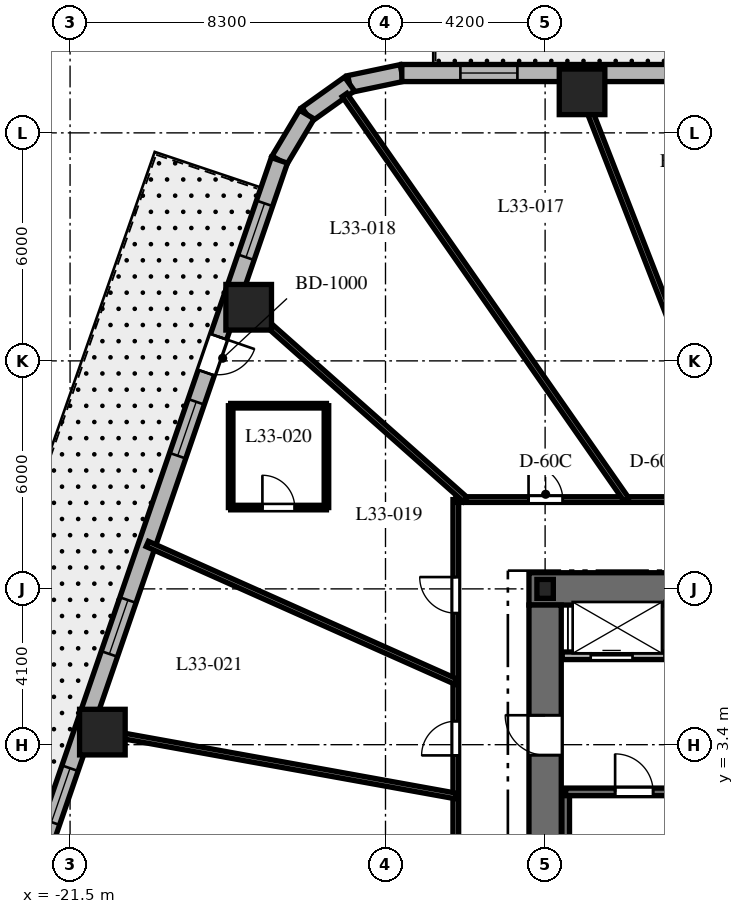
"""IFC4 building model, lengths in metres.
Left out: names, types, materials, properties, quantities, classifications, styles, units other than length and angle.
Written with IfcOpenShell. Run it as: python <this file> out.ifc"""

import sys

from ifc_helpers import new_model, si_unit, direction, frame, frame_2d, origin, origin_2d, place, context, subcontext, project, spatial, rectangle, i_section, extrude, element, fill, save


model = new_model("IFC4")
c1 = context("Model", 3, precision=1e-05, world=origin(), true_north=direction((0.0, 1.0)))
c2 = subcontext(c1, "Body", "Model", "MODEL_VIEW")
j1 = project(units=[si_unit("LENGTHUNIT", "METRE"), si_unit("PLANEANGLEUNIT", "RADIAN")], contexts=[c1])
p1 = place(None, origin())
s1 = spatial("IfcSite", under=j1, at=p1, CompositionType="ELEMENT")
p2 = place(p1, origin())
s2 = spatial("IfcBuilding", under=s1, at=p2, CompositionType="ELEMENT")
p3 = place(p2, frame((0.0, 0.0, 135.8)))
s3 = spatial("IfcBuildingStorey", under=s2, at=p3, CompositionType="ELEMENT", Elevation=135.8)
p4 = place(p3, frame((-9.425, 7.5, 0.0), z_axis=(0.0, 0.0, 1.0), x_axis=(1.0, 0.0, 0.0)))
e1 = element("IfcWall", 1, at=p4, inside=s3, PredefinedType="SHEAR", context=c2, shape_type="SweptSolid", body=[
    extrude(rectangle(XDim=9.475, YDim=0.85, at=frame_2d((4.738, 0.0))), origin(), (0.0, 0.0, 1.0), 3.7),
])
p5 = place(p3, frame((-9.0, -7.075, 0.0), z_axis=(0.0, 0.0, 1.0), x_axis=(0.0, 1.0, 0.0)))
e2 = element("IfcWall", 2, at=p5, inside=s3, PredefinedType="SHEAR", context=c2, shape_type="SweptSolid", body=[
    extrude(rectangle(XDim=14.15, YDim=0.85, at=frame_2d((7.075, 0.0))), origin(), (0.0, 0.0, 1.0), 3.7),
])
p6 = place(p5, frame((10.2, 0.0, 0.0)))
e3 = element("IfcOpeningElement", 3, at=p6, cuts=e2, PredefinedType="OPENING", context=c2, shape_type="SweptSolid", body=[
    extrude(rectangle(XDim=1.05, YDim=2.15, at=frame_2d((0.525, 1.075))), frame((0.0, 0.435, 0.0), z_axis=(0.0, -1.0, 0.0), x_axis=(1.0, 0.0, 0.0)), (0.0, 0.0, 1.0), 0.87),
])
p7 = place(p3, frame((-8.458, -6.985, 0.0), z_axis=(0.0, 0.0, 1.0), x_axis=(0.0, 1.0, 0.0)))
e4 = element("IfcWall", 4, at=p7, inside=s3, PredefinedType="SHEAR", context=c2, shape_type="SweptSolid", body=[
    extrude(rectangle(XDim=9.143, YDim=0.2, at=frame_2d((4.572, 0.0))), origin(), (0.0, 0.0, 1.0), 3.7),
])
p8 = place(p3, frame((-8.458, 2.158, 0.0), z_axis=(0.0, 0.0, 1.0), x_axis=(1.0, 0.0, 0.0)))
e5 = element("IfcWall", 5, at=p8, inside=s3, PredefinedType="SHEAR", context=c2, shape_type="SweptSolid", body=[
    extrude(rectangle(XDim=3.686, YDim=0.2, at=frame_2d((1.843, 0.0))), origin(), (0.0, 0.0, 1.0), 3.7),
])
p9 = place(p8, frame((1.3, 0.0, 0.0)))
e6 = element("IfcOpeningElement", 6, at=p9, cuts=e5, PredefinedType="OPENING", context=c2, shape_type="SweptSolid", body=[
    extrude(rectangle(XDim=1.0, YDim=2.15, at=frame_2d((0.5, 1.075))), frame((0.0, 0.11, 0.0), z_axis=(0.0, -1.0, 0.0), x_axis=(1.0, 0.0, 0.0)), (0.0, 0.0, 1.0), 0.22),
])
p10 = place(p3, frame((-9.0, 7.5, 0.0), z_axis=(0.0, 0.0, 1.0), x_axis=(1.0, 0.0, 0.0)))
e7 = element("IfcColumn", 7, at=p10, inside=s3, PredefinedType="COLUMN", context=c2, shape_type="SweptSolid", body=[
    extrude(i_section(OverallWidth=0.432, OverallDepth=0.498, WebThickness=0.056, FlangeThickness=0.089, at=origin_2d()), origin(), (0.0, 0.0, 1.0), 3.7),
])
for number, where, z_axis, x_axis in (
    (8, (-8.028, 20.58, 0.0), (0.0, 0.0, 1.0), (1.0, 0.0, 0.0)),
    (9, (-16.8, 14.911, 0.0), (0.0, 0.0, 1.0), (1.0, 0.0, 0.0)),
    (10, (-20.65, 3.731, 0.0), (0.0, 0.0, 1.0), (1.0, 0.0, 0.0)),
):
    element("IfcColumn", number, at=place(p3, frame(where, z_axis=z_axis, x_axis=x_axis)), inside=s3, PredefinedType="COLUMN", context=c2, shape_type="SweptSolid", body=[
        extrude(rectangle(XDim=1.2, YDim=1.2, at=origin_2d()), origin(), (0.0, 0.0, 1.0), 3.7),
    ])
p11 = place(p3, frame((-12.771, 21.075, 0.0), z_axis=(0.0, 0.0, 1.0), x_axis=(-0.97874281988, -0.205091424819, 0.0)))
e11 = element("IfcWall", 11, at=p11, inside=s3, PredefinedType="SOLIDWALL", context=c2, shape_type="SweptSolid", body=[
    extrude(rectangle(XDim=1.406, YDim=0.45, at=frame_2d((0.703, 0.0))), origin(), (0.0, 0.0, 1.0), 3.38),
])
p12 = place(p3, frame((-14.146, 20.787, 0.0), z_axis=(0.0, 0.0, 1.0), x_axis=(-0.814162929117, -0.580636482536, 0.0)))
e12 = element("IfcWall", 12, at=p12, inside=s3, PredefinedType="SOLIDWALL", context=c2, shape_type="SweptSolid", body=[
    extrude(rectangle(XDim=1.382, YDim=0.45, at=frame_2d((0.691, 0.0))), origin(), (0.0, 0.0, 1.0), 3.38),
])
p13 = place(p3, frame((-15.272, 19.984, 0.0), z_axis=(0.0, 0.0, 1.0), x_axis=(-0.512579347361, -0.858639862025, 0.0)))
e13 = element("IfcWall", 13, at=p13, inside=s3, PredefinedType="SOLIDWALL", context=c2, shape_type="SweptSolid", body=[
    extrude(rectangle(XDim=1.406, YDim=0.45, at=frame_2d((0.703, 0.0))), origin(), (0.0, 0.0, 1.0), 3.38),
])
p14 = place(p3, frame((11.012, 21.075, 0.0), z_axis=(0.0, 0.0, 1.0), x_axis=(-1.0, 0.0, 0.0)))
e14 = element("IfcWall", 14, at=p14, inside=s3, PredefinedType="SOLIDWALL", context=c2, shape_type="SweptSolid", body=[
    extrude(rectangle(XDim=23.782, YDim=0.45, at=frame_2d((11.891, 0.0))), origin(), (0.0, 0.0, 1.0), 3.38),
])
p15 = place(p14, frame((2.473, 0.0, 0.0)))
e15 = element("IfcOpeningElement", 15, at=p15, cuts=e14, PredefinedType="OPENING", context=c2, shape_type="SweptSolid", body=[
    extrude(rectangle(XDim=0.95, YDim=2.15, at=frame_2d((0.475, 1.075))), frame((0.0, 0.235, 0.0), z_axis=(0.0, -1.0, 0.0), x_axis=(1.0, 0.0, 0.0)), (0.0, 0.0, 1.0), 0.47),
])
p16 = place(p14, frame((11.142, 0.0, 0.8)))
e16 = element("IfcOpeningElement", 16, at=p16, cuts=e14, PredefinedType="OPENING", context=c2, shape_type="SweptSolid", body=[
    extrude(rectangle(XDim=1.5, YDim=1.8, at=frame_2d((0.75, 0.9))), frame((0.0, 0.235, 0.0), z_axis=(0.0, -1.0, 0.0), x_axis=(1.0, 0.0, 0.0)), (0.0, 0.0, 1.0), 0.47),
])
p17 = place(p14, frame((20.741, 0.0, 0.8)))
e17 = element("IfcOpeningElement", 17, at=p17, cuts=e14, PredefinedType="OPENING", context=c2, shape_type="SweptSolid", body=[
    extrude(rectangle(XDim=1.5, YDim=1.8, at=frame_2d((0.75, 0.9))), frame((0.0, 0.235, 0.0), z_axis=(0.0, -1.0, 0.0), x_axis=(1.0, 0.0, 0.0)), (0.0, 0.0, 1.0), 0.47),
])
p18 = place(p3, frame((-15.992, 18.777, 0.0), z_axis=(0.0, 0.0, 1.0), x_axis=(-0.325606988926, -0.945505202927, 0.0)))
e18 = element("IfcWall", 18, at=p18, inside=s3, PredefinedType="SOLIDWALL", context=c2, shape_type="SweptSolid", body=[
    extrude(rectangle(XDim=19.669, YDim=0.45, at=frame_2d((9.835, 0.0))), origin(), (0.0, 0.0, 1.0), 3.38),
])
p19 = place(p18, frame((4.909, 0.0, 0.0)))
e19 = element("IfcOpeningElement", 19, at=p19, cuts=e18, PredefinedType="OPENING", context=c2, shape_type="SweptSolid", body=[
    extrude(rectangle(XDim=1.0, YDim=2.15, at=frame_2d((0.5, 1.075))), frame((0.0, 0.235, 0.0), z_axis=(0.0, -1.0, 0.0), x_axis=(1.0, 0.0, 0.0)), (0.0, 0.0, 1.0), 0.47),
])
p20 = place(p18, frame((1.197, 0.0, 0.8)))
e20 = element("IfcOpeningElement", 20, at=p20, cuts=e18, PredefinedType="OPENING", context=c2, shape_type="SweptSolid", body=[
    extrude(rectangle(XDim=1.5, YDim=1.8, at=frame_2d((0.75, 0.9))), frame((0.0, 0.235, 0.0), z_axis=(0.0, -1.0, 0.0), x_axis=(1.0, 0.0, 0.0)), (0.0, 0.0, 1.0), 0.47),
])
p21 = place(p18, frame((6.72, 0.0, 0.8)))
e21 = element("IfcOpeningElement", 21, at=p21, cuts=e18, PredefinedType="OPENING", context=c2, shape_type="SweptSolid", body=[
    extrude(rectangle(XDim=1.5, YDim=1.8, at=frame_2d((0.75, 0.9))), frame((0.0, 0.235, 0.0), z_axis=(0.0, -1.0, 0.0), x_axis=(1.0, 0.0, 0.0)), (0.0, 0.0, 1.0), 0.47),
])
p22 = place(p18, frame((12.238, 0.0, 0.8)))
e22 = element("IfcOpeningElement", 22, at=p22, cuts=e18, PredefinedType="OPENING", context=c2, shape_type="SweptSolid", body=[
    extrude(rectangle(XDim=1.5, YDim=1.8, at=frame_2d((0.75, 0.9))), frame((0.0, 0.235, 0.0), z_axis=(0.0, -1.0, 0.0), x_axis=(1.0, 0.0, 0.0)), (0.0, 0.0, 1.0), 0.47),
])
p23 = place(p18, frame((16.918, 0.0, 0.8)))
e23 = element("IfcOpeningElement", 23, at=p23, cuts=e18, PredefinedType="OPENING", context=c2, shape_type="SweptSolid", body=[
    extrude(rectangle(XDim=1.5, YDim=1.8, at=frame_2d((0.75, 0.9))), frame((0.0, 0.235, 0.0), z_axis=(0.0, -1.0, 0.0), x_axis=(1.0, 0.0, 0.0)), (0.0, 0.0, 1.0), 0.47),
])
p24 = place(p3, frame((-8.55, 5.74, 0.0), z_axis=(0.0, 0.0, 1.0), x_axis=(1.0, 0.0, 0.0)))
e24 = element("IfcWall", 24, at=p24, inside=s3, PredefinedType="PARTITIONING", context=c2, shape_type="SweptSolid", body=[
    extrude(rectangle(XDim=4.05, YDim=0.2, at=frame_2d((2.025, 0.0))), origin(), (0.0, 0.0, 1.0), 3.38),
])
p25 = place(p24, frame((0.75, 0.0, 0.0)))
e25 = element("IfcOpeningElement", 25, at=p25, cuts=e24, PredefinedType="OPENING", context=c2, shape_type="SweptSolid", body=[
    extrude(rectangle(XDim=1.1, YDim=2.2, at=frame_2d((0.55, 1.1))), frame((0.0, 0.11, 0.0), z_axis=(0.0, -1.0, 0.0), x_axis=(1.0, 0.0, 0.0)), (0.0, 0.0, 1.0), 0.22),
])
p26 = place(p24, frame((2.9, 0.0, 0.0)))
e26 = element("IfcOpeningElement", 26, at=p26, cuts=e24, PredefinedType="OPENING", context=c2, shape_type="SweptSolid", body=[
    extrude(rectangle(XDim=0.85, YDim=2.03, at=frame_2d((0.425, 1.015))), frame((0.0, 0.11, 0.0), z_axis=(0.0, -1.0, 0.0), x_axis=(1.0, 0.0, 0.0)), (0.0, 0.0, 1.0), 0.22),
])
p27 = place(p3, frame((-11.35, -9.85, 0.0), z_axis=(0.0, 0.0, 1.0), x_axis=(0.0, 1.0, 0.0)))
e27 = element("IfcWall", 27, at=p27, inside=s3, PredefinedType="PARTITIONING", context=c2, shape_type="SweptSolid", body=[
    extrude(rectangle(XDim=19.7, YDim=0.15, at=frame_2d((9.85, 0.0))), origin(), (0.0, 0.0, 1.0), 2.82),
])
p28 = place(p27, frame((16.711, 0.0, 0.0)))
e28 = element("IfcOpeningElement", 28, at=p28, cuts=e27, PredefinedType="OPENING", context=c2, shape_type="SweptSolid", body=[
    extrude(rectangle(XDim=0.95, YDim=2.03, at=frame_2d((0.475, 1.015))), frame((0.0, 0.085, 0.0), z_axis=(0.0, -1.0, 0.0), x_axis=(1.0, 0.0, 0.0)), (0.0, 0.0, 1.0), 0.17),
])
p29 = place(p27, frame((12.968, 0.0, 0.0)))
e29 = element("IfcOpeningElement", 29, at=p29, cuts=e27, PredefinedType="OPENING", context=c2, shape_type="SweptSolid", body=[
    extrude(rectangle(XDim=0.9, YDim=2.03, at=frame_2d((0.45, 1.015))), frame((0.0, 0.085, 0.0), z_axis=(0.0, -1.0, 0.0), x_axis=(1.0, 0.0, 0.0)), (0.0, 0.0, 1.0), 0.17),
])
p30 = place(p27, frame((8.836, 0.0, 0.0)))
e30 = element("IfcOpeningElement", 30, at=p30, cuts=e27, PredefinedType="OPENING", context=c2, shape_type="SweptSolid", body=[
    extrude(rectangle(XDim=0.95, YDim=2.03, at=frame_2d((0.475, 1.015))), frame((0.0, 0.085, 0.0), z_axis=(0.0, -1.0, 0.0), x_axis=(1.0, 0.0, 0.0)), (0.0, 0.0, 1.0), 0.17),
])
p31 = place(p27, frame((4.448, 0.0, 0.0)))
e31 = element("IfcOpeningElement", 31, at=p31, cuts=e27, PredefinedType="OPENING", context=c2, shape_type="SweptSolid", body=[
    extrude(rectangle(XDim=0.95, YDim=2.03, at=frame_2d((0.475, 1.015))), frame((0.0, 0.085, 0.0), z_axis=(0.0, -1.0, 0.0), x_axis=(1.0, 0.0, 0.0)), (0.0, 0.0, 1.0), 0.17),
])
p32 = place(p27, frame((1.249, 0.0, 0.0)))
e32 = element("IfcOpeningElement", 32, at=p32, cuts=e27, PredefinedType="OPENING", context=c2, shape_type="SweptSolid", body=[
    extrude(rectangle(XDim=0.9, YDim=2.03, at=frame_2d((0.45, 1.015))), frame((0.0, 0.085, 0.0), z_axis=(0.0, -1.0, 0.0), x_axis=(1.0, 0.0, 0.0)), (0.0, 0.0, 1.0), 0.17),
])
p33 = place(p3, frame((-11.35, 9.85, 0.0), z_axis=(0.0, 0.0, 1.0), x_axis=(1.0, 0.0, 0.0)))
e33 = element("IfcWall", 33, at=p33, inside=s3, PredefinedType="PARTITIONING", context=c2, shape_type="SweptSolid", body=[
    extrude(rectangle(XDim=22.7, YDim=0.15, at=frame_2d((11.35, 0.0))), origin(), (0.0, 0.0, 1.0), 2.82),
])
p34 = place(p33, frame((17.237, 0.0, 0.0)))
e34 = element("IfcOpeningElement", 34, at=p34, cuts=e33, PredefinedType="OPENING", context=c2, shape_type="SweptSolid", body=[
    extrude(rectangle(XDim=0.95, YDim=2.03, at=frame_2d((0.475, 1.015))), frame((0.0, 0.085, 0.0), z_axis=(0.0, -1.0, 0.0), x_axis=(1.0, 0.0, 0.0)), (0.0, 0.0, 1.0), 0.17),
])
p35 = place(p33, frame((10.45, 0.0, 0.0)))
e35 = element("IfcOpeningElement", 35, at=p35, cuts=e33, PredefinedType="OPENING", context=c2, shape_type="SweptSolid", body=[
    extrude(rectangle(XDim=0.95, YDim=2.03, at=frame_2d((0.475, 1.015))), frame((0.0, 0.085, 0.0), z_axis=(0.0, -1.0, 0.0), x_axis=(1.0, 0.0, 0.0)), (0.0, 0.0, 1.0), 0.17),
])
p36 = place(p33, frame((5.522, 0.0, 0.0)))
e36 = element("IfcOpeningElement", 36, at=p36, cuts=e33, PredefinedType="OPENING", context=c2, shape_type="SweptSolid", body=[
    extrude(rectangle(XDim=0.9, YDim=2.03, at=frame_2d((0.45, 1.015))), frame((0.0, 0.085, 0.0), z_axis=(0.0, -1.0, 0.0), x_axis=(1.0, 0.0, 0.0)), (0.0, 0.0, 1.0), 0.17),
])
p37 = place(p33, frame((1.914, 0.0, 0.0)))
e37 = element("IfcOpeningElement", 37, at=p37, cuts=e33, PredefinedType="OPENING", context=c2, shape_type="SweptSolid", body=[
    extrude(rectangle(XDim=0.9, YDim=2.03, at=frame_2d((0.45, 1.015))), frame((0.0, 0.085, 0.0), z_axis=(0.0, -1.0, 0.0), x_axis=(1.0, 0.0, 0.0)), (0.0, 0.0, 1.0), 0.17),
])
p38 = place(p3, frame((-3.842, 9.85, 0.0), z_axis=(0.0, 0.0, 1.0), x_axis=(-0.363432685593, 0.931620460833, 0.0)))
e38 = element("IfcWall", 38, at=p38, inside=s3, PredefinedType="PARTITIONING", context=c2, shape_type="SweptSolid", body=[
    extrude(rectangle(XDim=12.049, YDim=0.15, at=frame_2d((6.024, 0.0))), origin(), (0.0, 0.0, 1.0), 2.52),
])
p39 = place(p3, frame((-6.861, 9.85, 0.0), z_axis=(0.0, 0.0, 1.0), x_axis=(-0.571575431292, 0.820549527051, 0.0)))
e39 = element("IfcWall", 39, at=p39, inside=s3, PredefinedType="PARTITIONING", context=c2, shape_type="SweptSolid", body=[
    extrude(rectangle(XDim=12.975, YDim=0.15, at=frame_2d((6.488, 0.0))), origin(), (0.0, 0.0, 1.0), 2.52),
])
p40 = place(p3, frame((-11.098, 9.85, 0.0), z_axis=(0.0, 0.0, 1.0), x_axis=(-0.747904295103, 0.663806572253, 0.0)))
e40 = element("IfcWall", 40, at=p40, inside=s3, PredefinedType="PARTITIONING", context=c2, shape_type="SweptSolid", body=[
    extrude(rectangle(XDim=8.16, YDim=0.15, at=frame_2d((4.08, 0.0))), origin(), (0.0, 0.0, 1.0), 2.52),
])
p41 = place(p3, frame((-11.35, 5.062, 0.0), z_axis=(0.0, 0.0, 1.0), x_axis=(-0.91329663997, 0.407295037312, 0.0)))
e41 = element("IfcWall", 41, at=p41, inside=s3, PredefinedType="PARTITIONING", context=c2, shape_type="SweptSolid", body=[
    extrude(rectangle(XDim=8.889, YDim=0.15, at=frame_2d((4.445, 0.0))), origin(), (0.0, 0.0, 1.0), 2.52),
])
p42 = place(p3, frame((-11.35, 2.051, 0.0), z_axis=(0.0, 0.0, 1.0), x_axis=(-0.984068313063, 0.177790762484, 0.0)))
e42 = element("IfcWall", 42, at=p42, inside=s3, PredefinedType="PARTITIONING", context=c2, shape_type="SweptSolid", body=[
    extrude(rectangle(XDim=9.951, YDim=0.15, at=frame_2d((4.976, 0.0))), origin(), (0.0, 0.0, 1.0), 2.52),
])
p43 = place(p3, frame((-17.274, 9.64, 0.0), z_axis=(0.0, 0.0, 1.0), x_axis=(1.0, 0.0, 0.0)))
e43 = element("IfcWall", 43, at=p43, inside=s3, PredefinedType="PARTITIONING", context=c2, shape_type="SweptSolid", body=[
    extrude(rectangle(XDim=2.52, YDim=0.12, at=frame_2d((1.26, 0.0))), origin(), (0.0, 0.0, 1.0), 2.952),
])
p44 = place(p43, frame((0.835, 0.0, 0.0)))
e44 = element("IfcOpeningElement", 44, at=p44, cuts=e43, PredefinedType="OPENING", context=c2, shape_type="SweptSolid", body=[
    extrude(rectangle(XDim=0.85, YDim=2.03, at=frame_2d((0.425, 1.015))), frame((0.0, 0.07, 0.0), z_axis=(0.0, -1.0, 0.0), x_axis=(1.0, 0.0, 0.0)), (0.0, 0.0, 1.0), 0.14),
])
p45 = place(p3, frame((-14.754, 9.64, 0.0), z_axis=(0.0, 0.0, 1.0), x_axis=(0.0, 1.0, 0.0)))
e45 = element("IfcWall", 45, at=p45, inside=s3, PredefinedType="PARTITIONING", context=c2, shape_type="SweptSolid", body=[
    extrude(rectangle(XDim=2.68, YDim=0.12, at=frame_2d((1.34, 0.0))), origin(), (0.0, 0.0, 1.0), 2.952),
])
p46 = place(p3, frame((-14.754, 12.32, 0.0), z_axis=(0.0, 0.0, 1.0), x_axis=(-1.0, 0.0, 0.0)))
e46 = element("IfcWall", 46, at=p46, inside=s3, PredefinedType="PARTITIONING", context=c2, shape_type="SweptSolid", body=[
    extrude(rectangle(XDim=2.52, YDim=0.12, at=frame_2d((1.26, 0.0))), origin(), (0.0, 0.0, 1.0), 3.38),
])
p47 = place(p3, frame((-17.274, 12.32, 0.0), z_axis=(0.0, 0.0, 1.0), x_axis=(0.0, -1.0, 0.0)))
e47 = element("IfcWall", 47, at=p47, inside=s3, PredefinedType="PARTITIONING", context=c2, shape_type="SweptSolid", body=[
    extrude(rectangle(XDim=2.68, YDim=0.12, at=frame_2d((1.34, 0.0))), origin(), (0.0, 0.0, 1.0), 3.38),
])
p48 = place(p17, origin())
e48 = element("IfcWindow", 48, at=p48, inside=s3, PartitioningType="SINGLE_PANEL", PredefinedType="WINDOW", context=c2, shape_type="SweptSolid", body=[
    extrude(rectangle(XDim=1.5, YDim=1.8, at=frame_2d((0.75, 0.9))), frame((0.0, 0.03, 0.0), z_axis=(0.0, -1.0, 0.0), x_axis=(1.0, 0.0, 0.0)), (0.0, 0.0, 1.0), 0.06),
])
fill(e17, e48)
p49 = place(p19, origin())
e49 = element("IfcDoor", 49, at=p49, inside=s3, OperationType="SINGLE_SWING_LEFT", PredefinedType="DOOR", context=c2, shape_type="SweptSolid", body=[
    extrude(rectangle(XDim=1.0, YDim=2.15, at=frame_2d((0.5, 1.075))), frame((0.0, 0.025, 0.0), z_axis=(0.0, -1.0, 0.0), x_axis=(1.0, 0.0, 0.0)), (0.0, 0.0, 1.0), 0.05),
])
fill(e19, e49)
p50 = place(p20, origin())
e50 = element("IfcWindow", 50, at=p50, inside=s3, PartitioningType="SINGLE_PANEL", PredefinedType="WINDOW", context=c2, shape_type="SweptSolid", body=[
    extrude(rectangle(XDim=1.5, YDim=1.8, at=frame_2d((0.75, 0.9))), frame((0.0, 0.03, 0.0), z_axis=(0.0, -1.0, 0.0), x_axis=(1.0, 0.0, 0.0)), (0.0, 0.0, 1.0), 0.06),
])
fill(e20, e50)
p51 = place(p21, origin())
e51 = element("IfcWindow", 51, at=p51, inside=s3, PartitioningType="SINGLE_PANEL", PredefinedType="WINDOW", context=c2, shape_type="SweptSolid", body=[
    extrude(rectangle(XDim=1.5, YDim=1.8, at=frame_2d((0.75, 0.9))), frame((0.0, 0.03, 0.0), z_axis=(0.0, -1.0, 0.0), x_axis=(1.0, 0.0, 0.0)), (0.0, 0.0, 1.0), 0.06),
])
fill(e21, e51)
p52 = place(p22, origin())
e52 = element("IfcWindow", 52, at=p52, inside=s3, PartitioningType="SINGLE_PANEL", PredefinedType="WINDOW", context=c2, shape_type="SweptSolid", body=[
    extrude(rectangle(XDim=1.5, YDim=1.8, at=frame_2d((0.75, 0.9))), frame((0.0, 0.03, 0.0), z_axis=(0.0, -1.0, 0.0), x_axis=(1.0, 0.0, 0.0)), (0.0, 0.0, 1.0), 0.06),
])
fill(e22, e52)
p53 = place(p23, origin())
e53 = element("IfcWindow", 53, at=p53, inside=s3, PartitioningType="SINGLE_PANEL", PredefinedType="WINDOW", context=c2, shape_type="SweptSolid", body=[
    extrude(rectangle(XDim=1.5, YDim=1.8, at=frame_2d((0.75, 0.9))), frame((0.0, 0.03, 0.0), z_axis=(0.0, -1.0, 0.0), x_axis=(1.0, 0.0, 0.0)), (0.0, 0.0, 1.0), 0.06),
])
fill(e23, e53)
p54 = place(p9, origin())
e54 = element("IfcDoor", 54, at=p54, inside=s3, OperationType="SINGLE_SWING_LEFT", PredefinedType="DOOR", context=c2, shape_type="SweptSolid", body=[
    extrude(rectangle(XDim=1.0, YDim=2.15, at=frame_2d((0.5, 1.075))), frame((0.0, 0.025, 0.0), z_axis=(0.0, -1.0, 0.0), x_axis=(1.0, 0.0, 0.0)), (0.0, 0.0, 1.0), 0.05),
])
fill(e6, e54)
p55 = place(p6, origin())
e55 = element("IfcDoor", 55, at=p55, inside=s3, OperationType="SINGLE_SWING_RIGHT", PredefinedType="DOOR", context=c2, shape_type="SweptSolid", body=[
    extrude(rectangle(XDim=1.05, YDim=2.15, at=frame_2d((0.525, 1.075))), frame((0.0, 0.025, 0.0), z_axis=(0.0, -1.0, 0.0), x_axis=(1.0, 0.0, 0.0)), (0.0, 0.0, 1.0), 0.05),
])
fill(e3, e55)
p56 = place(p25, origin())
e56 = element("IfcDoor", 56, at=p56, inside=s3, OperationType="SLIDING_TO_LEFT", PredefinedType="DOOR", context=c2, shape_type="SweptSolid", body=[
    extrude(rectangle(XDim=1.1, YDim=2.2, at=frame_2d((0.55, 1.1))), frame((0.0, 0.025, 0.0), z_axis=(0.0, -1.0, 0.0), x_axis=(1.0, 0.0, 0.0)), (0.0, 0.0, 1.0), 0.05),
])
fill(e25, e56)
p57 = place(p37, origin())
e57 = element("IfcDoor", 57, at=p57, inside=s3, OperationType="SINGLE_SWING_LEFT", PredefinedType="DOOR", context=c2, shape_type="SweptSolid", body=[
    extrude(rectangle(XDim=0.9, YDim=2.03, at=frame_2d((0.45, 1.015))), frame((0.0, 0.025, 0.0), z_axis=(0.0, -1.0, 0.0), x_axis=(1.0, 0.0, 0.0)), (0.0, 0.0, 1.0), 0.05),
])
fill(e37, e57)
p58 = place(p28, origin())
e58 = element("IfcDoor", 58, at=p58, inside=s3, OperationType="SINGLE_SWING_RIGHT", PredefinedType="DOOR", context=c2, shape_type="SweptSolid", body=[
    extrude(rectangle(XDim=0.95, YDim=2.03, at=frame_2d((0.475, 1.015))), frame((0.0, 0.025, 0.0), z_axis=(0.0, -1.0, 0.0), x_axis=(1.0, 0.0, 0.0)), (0.0, 0.0, 1.0), 0.05),
])
fill(e28, e58)
p59 = place(p44, origin())
e59 = element("IfcDoor", 59, at=p59, inside=s3, OperationType="SINGLE_SWING_LEFT", PredefinedType="DOOR", context=c2, shape_type="SweptSolid", body=[
    extrude(rectangle(XDim=0.85, YDim=2.03, at=frame_2d((0.425, 1.015))), frame((0.0, 0.025, 0.0), z_axis=(0.0, -1.0, 0.0), x_axis=(1.0, 0.0, 0.0)), (0.0, 0.0, 1.0), 0.05),
])
fill(e44, e59)
p60 = place(p29, origin())
e60 = element("IfcDoor", 60, at=p60, inside=s3, OperationType="SINGLE_SWING_LEFT", PredefinedType="DOOR", context=c2, shape_type="SweptSolid", body=[
    extrude(rectangle(XDim=0.9, YDim=2.03, at=frame_2d((0.45, 1.015))), frame((0.0, 0.025, 0.0), z_axis=(0.0, -1.0, 0.0), x_axis=(1.0, 0.0, 0.0)), (0.0, 0.0, 1.0), 0.05),
])
fill(e29, e60)
save(model, sys.argv[1])
